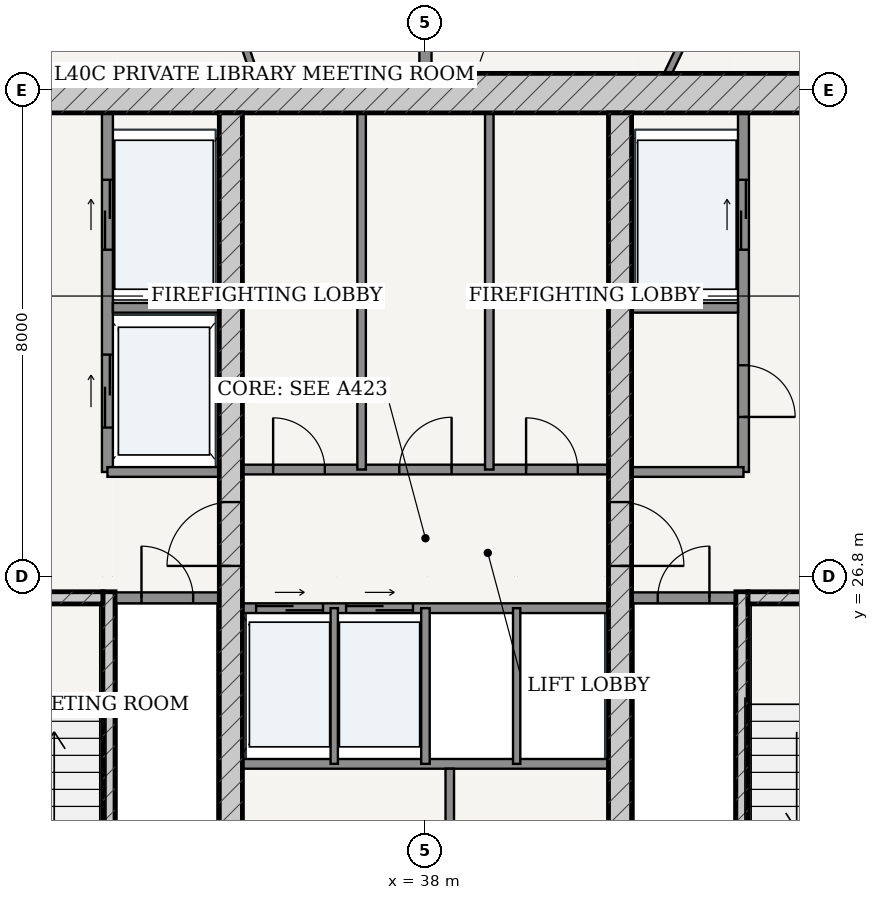
"""IFC4 building model, lengths in metres.
Left out: names, types, materials, properties, quantities, classifications, styles, units other than length and angle.
Written with IfcOpenShell. Run it as: python <this file> out.ifc"""

import sys

from ifc_helpers import new_model, si_unit, direction, frame, frame_2d, origin, place, context, subcontext, project, spatial, rectangle, extrude, source, transform, mapped, element, fill, save


model = new_model("IFC4")
c1 = context("Model", 3, precision=1e-05, world=origin(), true_north=direction((-0.2419218956, 0.970295726276)))
c2 = subcontext(c1, "Body", "Model", "MODEL_VIEW")
j1 = project(units=[si_unit("LENGTHUNIT", "METRE"), si_unit("PLANEANGLEUNIT", "RADIAN")], contexts=[c1])
p1 = place(None, origin())
s1 = spatial("IfcSite", under=j1, at=p1, CompositionType="ELEMENT")
p2 = place(p1, origin())
s2 = spatial("IfcBuilding", under=s1, at=p2, CompositionType="ELEMENT")
p3 = place(p2, frame((0.0, 0.0, 153.4)))
s3 = spatial("IfcBuildingStorey", under=s2, at=p3, CompositionType="ELEMENT", Elevation=153.4)
p4 = place(p3, frame((28.725, 34.75, 0.0), z_axis=(0.0, 0.0, 1.0), x_axis=(1.0, 0.0, 0.0)))
e1 = element("IfcWall", 1, at=p4, inside=s3, PredefinedType="SHEAR", context=c2, shape_type="SweptSolid", body=[
    extrude(rectangle(XDim=18.55, YDim=0.65, at=frame_2d((9.275, 0.0))), origin(), (0.0, 0.0, 1.0), 3.33),
])
p5 = place(p3, frame((32.795, 19.175, 0.0), z_axis=(0.0, 0.0, 1.0), x_axis=(0.0, 1.0, 0.0)))
e2 = element("IfcWall", 2, at=p5, inside=s3, PredefinedType="SOLIDWALL", context=c2, shape_type="SweptSolid", body=[
    extrude(rectangle(XDim=7.375, YDim=0.2, at=frame_2d((3.688, 0.0))), origin(), (0.0, 0.0, 1.0), 3.33),
])
p6 = place(p3, frame((29.375, 26.45, 0.0), z_axis=(0.0, 0.0, 1.0), x_axis=(1.0, 0.0, 0.0)))
e3 = element("IfcWall", 3, at=p6, inside=s3, PredefinedType="SOLIDWALL", context=c2, shape_type="SweptSolid", body=[
    extrude(rectangle(XDim=3.32, YDim=0.2, at=frame_2d((1.66, 0.0))), origin(), (0.0, 0.0, 1.0), 3.33),
])
p7 = place(p6, frame((1.185, 0.0, 0.0)))
e4 = element("IfcOpeningElement", 4, at=p7, cuts=e3, PredefinedType="OPENING", context=c2, shape_type="SweptSolid", body=[
    extrude(rectangle(XDim=0.95, YDim=2.15, at=frame_2d((0.475, 1.075))), frame((0.0, 0.11, 0.0), z_axis=(0.0, -1.0, 0.0), x_axis=(1.0, 0.0, 0.0)), (0.0, 0.0, 1.0), 0.22),
])
p8 = place(p3, frame((43.205, 19.175, 0.0), z_axis=(0.0, 0.0, 1.0), x_axis=(0.0, 1.0, 0.0)))
e5 = element("IfcWall", 5, at=p8, inside=s3, PredefinedType="SOLIDWALL", context=c2, shape_type="SweptSolid", body=[
    extrude(rectangle(XDim=7.375, YDim=0.2, at=frame_2d((3.688, 0.0))), origin(), (0.0, 0.0, 1.0), 3.33),
])
p9 = place(p3, frame((43.305, 26.45, 0.0), z_axis=(0.0, 0.0, 1.0), x_axis=(1.0, 0.0, 0.0)))
e6 = element("IfcWall", 6, at=p9, inside=s3, PredefinedType="SOLIDWALL", context=c2, shape_type="SweptSolid", body=[
    extrude(rectangle(XDim=3.32, YDim=0.2, at=frame_2d((1.66, 0.0))), origin(), (0.0, 0.0, 1.0), 3.33),
])
p10 = place(p9, frame((1.185, 0.0, 0.0)))
e7 = element("IfcOpeningElement", 7, at=p10, cuts=e6, PredefinedType="OPENING", context=c2, shape_type="SweptSolid", body=[
    extrude(rectangle(XDim=0.95, YDim=2.15, at=frame_2d((0.475, 1.075))), frame((0.0, 0.11, 0.0), z_axis=(0.0, -1.0, 0.0), x_axis=(1.0, 0.0, 0.0)), (0.0, 0.0, 1.0), 0.22),
])
p11 = place(p3, frame((34.8, 19.175, 0.0), z_axis=(0.0, 0.0, 1.0), x_axis=(0.0, 1.0, 0.0)))
e8 = element("IfcWall", 8, at=p11, inside=s3, PredefinedType="SHEAR", context=c2, shape_type="SweptSolid", body=[
    extrude(rectangle(XDim=15.25, YDim=0.38, at=frame_2d((7.625, 0.0))), origin(), (0.0, 0.0, 1.0), 3.33),
])
p12 = place(p11, frame((7.8, 0.0, 0.0)))
e9 = element("IfcOpeningElement", 9, at=p12, cuts=e8, PredefinedType="OPENING", context=c2, shape_type="SweptSolid", body=[
    extrude(rectangle(XDim=1.05, YDim=2.15, at=frame_2d((0.525, 1.075))), frame((0.0, 0.2, 0.0), z_axis=(0.0, -1.0, 0.0), x_axis=(1.0, 0.0, 0.0)), (0.0, 0.0, 1.0), 0.4),
])
p13 = place(p3, frame((41.2, 19.175, 0.0), z_axis=(0.0, 0.0, 1.0), x_axis=(0.0, 1.0, 0.0)))
e10 = element("IfcWall", 10, at=p13, inside=s3, PredefinedType="SHEAR", context=c2, shape_type="SweptSolid", body=[
    extrude(rectangle(XDim=15.25, YDim=0.38, at=frame_2d((7.625, 0.0))), origin(), (0.0, 0.0, 1.0), 3.33),
])
p14 = place(p13, frame((7.8, 0.0, 0.0)))
e11 = element("IfcOpeningElement", 11, at=p14, cuts=e10, PredefinedType="OPENING", context=c2, shape_type="SweptSolid", body=[
    extrude(rectangle(XDim=1.05, YDim=2.15, at=frame_2d((0.525, 1.075))), frame((0.0, 0.2, 0.0), z_axis=(0.0, -1.0, 0.0), x_axis=(1.0, 0.0, 0.0)), (0.0, 0.0, 1.0), 0.4),
])
p15 = place(p3, frame((32.9, 26.45, 0.0), z_axis=(0.0, 0.0, 1.0), x_axis=(1.0, 0.0, 0.0)))
e12 = element("IfcWall", 12, at=p15, inside=s3, PredefinedType="PARTITIONING", context=c2, shape_type="SweptSolid", body=[
    extrude(rectangle(XDim=1.71, YDim=0.18, at=frame_2d((0.855, 0.0))), origin(), (0.0, 0.0, 1.0), 3.33),
])
p16 = place(p15, frame((0.43, 0.0, 0.0)))
e13 = element("IfcOpeningElement", 13, at=p16, cuts=e12, PredefinedType="OPENING", context=c2, shape_type="SweptSolid", body=[
    extrude(rectangle(XDim=0.85, YDim=2.1, at=frame_2d((0.425, 1.05))), frame((0.0, 0.1, 0.0), z_axis=(0.0, -1.0, 0.0), x_axis=(1.0, 0.0, 0.0)), (0.0, 0.0, 1.0), 0.2),
])
p17 = place(p3, frame((41.39, 26.45, 0.0), z_axis=(0.0, 0.0, 1.0), x_axis=(1.0, 0.0, 0.0)))
e14 = element("IfcWall", 14, at=p17, inside=s3, PredefinedType="PARTITIONING", context=c2, shape_type="SweptSolid", body=[
    extrude(rectangle(XDim=1.71, YDim=0.18, at=frame_2d((0.855, 0.0))), origin(), (0.0, 0.0, 1.0), 3.33),
])
p18 = place(p17, frame((0.43, 0.0, 0.0)))
e15 = element("IfcOpeningElement", 15, at=p18, cuts=e14, PredefinedType="OPENING", context=c2, shape_type="SweptSolid", body=[
    extrude(rectangle(XDim=0.85, YDim=2.1, at=frame_2d((0.425, 1.05))), frame((0.0, 0.1, 0.0), z_axis=(0.0, -1.0, 0.0), x_axis=(1.0, 0.0, 0.0)), (0.0, 0.0, 1.0), 0.2),
])
p19 = place(p3, frame((32.77, 28.52, 0.0), z_axis=(0.0, 0.0, 1.0), x_axis=(0.0, 1.0, 0.0)))
e16 = element("IfcWall", 16, at=p19, inside=s3, PredefinedType="PARTITIONING", context=c2, shape_type="SweptSolid", body=[
    extrude(rectangle(XDim=5.905, YDim=0.18, at=frame_2d((2.953, 0.0))), origin(), (0.0, 0.0, 1.0), 3.33),
])
p20 = place(p19, frame((3.655, 0.0, 0.0)))
e17 = element("IfcOpeningElement", 17, at=p20, cuts=e16, PredefinedType="OPENING", context=c2, shape_type="SweptSolid", body=[
    extrude(rectangle(XDim=1.15, YDim=2.2, at=frame_2d((0.575, 1.1))), frame((0.0, 0.1, 0.0), z_axis=(0.0, -1.0, 0.0), x_axis=(1.0, 0.0, 0.0)), (0.0, 0.0, 1.0), 0.2),
])
p21 = place(p19, frame((0.73, 0.0, 0.0)))
e18 = element("IfcOpeningElement", 18, at=p21, cuts=e16, PredefinedType="OPENING", context=c2, shape_type="SweptSolid", body=[
    extrude(rectangle(XDim=1.2, YDim=2.25, at=frame_2d((0.6, 1.125))), frame((0.0, 0.1, 0.0), z_axis=(0.0, -1.0, 0.0), x_axis=(1.0, 0.0, 0.0)), (0.0, 0.0, 1.0), 0.2),
])
p22 = place(p3, frame((32.86, 31.22, 0.0), z_axis=(0.0, 0.0, 1.0), x_axis=(1.0, 0.0, 0.0)))
e19 = element("IfcWall", 19, at=p22, inside=s3, PredefinedType="PARTITIONING", context=c2, shape_type="SweptSolid", body=[
    extrude(rectangle(XDim=1.75, YDim=0.16, at=frame_2d((0.875, 0.0))), origin(), (0.0, 0.0, 1.0), 3.33),
])
p23 = place(p3, frame((32.77, 28.52, 0.0), z_axis=(0.0, 0.0, 1.0), x_axis=(1.0, 0.0, 0.0)))
e20 = element("IfcWall", 20, at=p23, inside=s3, PredefinedType="PARTITIONING", context=c2, shape_type="SweptSolid", body=[
    extrude(rectangle(XDim=1.84, YDim=0.16, at=frame_2d((0.92, 0.0))), origin(), (0.0, 0.0, 1.0), 3.33),
])
p24 = place(p3, frame((43.23, 28.52, 0.0), z_axis=(0.0, 0.0, 1.0), x_axis=(0.0, 1.0, 0.0)))
e21 = element("IfcWall", 21, at=p24, inside=s3, PredefinedType="PARTITIONING", context=c2, shape_type="SweptSolid", body=[
    extrude(rectangle(XDim=5.905, YDim=0.18, at=frame_2d((2.953, 0.0))), origin(), (0.0, 0.0, 1.0), 3.33),
])
p25 = place(p24, frame((0.905, 0.0, 0.0)))
e22 = element("IfcOpeningElement", 22, at=p25, cuts=e21, PredefinedType="OPENING", context=c2, shape_type="SweptSolid", body=[
    extrude(rectangle(XDim=0.85, YDim=2.1, at=frame_2d((0.425, 1.05))), frame((0.0, 0.1, 0.0), z_axis=(0.0, -1.0, 0.0), x_axis=(1.0, 0.0, 0.0)), (0.0, 0.0, 1.0), 0.2),
])
p26 = place(p24, frame((3.655, 0.0, 0.0)))
e23 = element("IfcOpeningElement", 23, at=p26, cuts=e21, PredefinedType="OPENING", context=c2, shape_type="SweptSolid", body=[
    extrude(rectangle(XDim=1.15, YDim=2.2, at=frame_2d((0.575, 1.1))), frame((0.0, 0.1, 0.0), z_axis=(0.0, -1.0, 0.0), x_axis=(1.0, 0.0, 0.0)), (0.0, 0.0, 1.0), 0.2),
])
p27 = place(p3, frame((41.39, 31.22, 0.0), z_axis=(0.0, 0.0, 1.0), x_axis=(1.0, 0.0, 0.0)))
e24 = element("IfcWall", 24, at=p27, inside=s3, PredefinedType="PARTITIONING", context=c2, shape_type="SweptSolid", body=[
    extrude(rectangle(XDim=1.75, YDim=0.16, at=frame_2d((0.875, 0.0))), origin(), (0.0, 0.0, 1.0), 3.33),
])
p28 = place(p3, frame((41.39, 28.52, 0.0), z_axis=(0.0, 0.0, 1.0), x_axis=(1.0, 0.0, 0.0)))
e25 = element("IfcWall", 25, at=p28, inside=s3, PredefinedType="PARTITIONING", context=c2, shape_type="SweptSolid", body=[
    extrude(rectangle(XDim=1.84, YDim=0.16, at=frame_2d((0.92, 0.0))), origin(), (0.0, 0.0, 1.0), 3.33),
])
p29 = place(p3, frame((34.99, 28.56, 0.0), z_axis=(0.0, 0.0, 1.0), x_axis=(1.0, 0.0, 0.0)))
e26 = element("IfcWall", 26, at=p29, inside=s3, PredefinedType="PARTITIONING", context=c2, shape_type="SweptSolid", body=[
    extrude(rectangle(XDim=6.02, YDim=0.16, at=frame_2d((3.01, 0.0))), origin(), (0.0, 0.0, 1.0), 3.33),
])
p30 = place(p29, frame((0.505, 0.0, 0.0)))
e27 = element("IfcOpeningElement", 27, at=p30, cuts=e26, PredefinedType="OPENING", context=c2, shape_type="SweptSolid", body=[
    extrude(rectangle(XDim=0.85, YDim=2.1, at=frame_2d((0.425, 1.05))), frame((0.0, 0.09, 0.0), z_axis=(0.0, -1.0, 0.0), x_axis=(1.0, 0.0, 0.0)), (0.0, 0.0, 1.0), 0.18),
])
p31 = place(p29, frame((2.58, 0.0, 0.0)))
e28 = element("IfcOpeningElement", 28, at=p31, cuts=e26, PredefinedType="OPENING", context=c2, shape_type="SweptSolid", body=[
    extrude(rectangle(XDim=0.86, YDim=2.1, at=frame_2d((0.43, 1.05))), frame((0.0, 0.09, 0.0), z_axis=(0.0, -1.0, 0.0), x_axis=(1.0, 0.0, 0.0)), (0.0, 0.0, 1.0), 0.18),
])
p32 = place(p29, frame((4.665, 0.0, 0.0)))
e29 = element("IfcOpeningElement", 29, at=p32, cuts=e26, PredefinedType="OPENING", context=c2, shape_type="SweptSolid", body=[
    extrude(rectangle(XDim=0.85, YDim=2.1, at=frame_2d((0.425, 1.05))), frame((0.0, 0.09, 0.0), z_axis=(0.0, -1.0, 0.0), x_axis=(1.0, 0.0, 0.0)), (0.0, 0.0, 1.0), 0.18),
])
for number, where, z_axis, x_axis in (
    (30, (36.95, 28.56, 0.0), (0.0, 0.0, 1.0), (0.0, 1.0, 0.0)),
    (31, (39.05, 28.56, 0.0), (0.0, 0.0, 1.0), (0.0, 1.0, 0.0)),
):
    element("IfcWall", number, at=place(p3, frame(where, z_axis=z_axis, x_axis=x_axis)), inside=s3, PredefinedType="PARTITIONING", context=c2, shape_type="SweptSolid", body=[
        extrude(rectangle(XDim=5.865, YDim=0.14, at=frame_2d((2.933, 0.0))), origin(), (0.0, 0.0, 1.0), 3.33),
    ])
p33 = place(p3, frame((34.99, 26.28, 0.0), z_axis=(0.0, 0.0, 1.0), x_axis=(1.0, 0.0, 0.0)))
e32 = element("IfcWall", 32, at=p33, inside=s3, PredefinedType="PARTITIONING", context=c2, shape_type="SweptSolid", body=[
    extrude(rectangle(XDim=6.02, YDim=0.16, at=frame_2d((3.01, 0.0))), origin(), (0.0, 0.0, 1.0), 3.33),
])
p34 = place(p33, frame((0.225, 0.0, 0.0)))
e33 = element("IfcOpeningElement", 33, at=p34, cuts=e32, PredefinedType="OPENING", context=c2, shape_type="SweptSolid", body=[
    extrude(rectangle(XDim=1.1, YDim=2.2, at=frame_2d((0.55, 1.1))), frame((0.0, 0.09, 0.0), z_axis=(0.0, -1.0, 0.0), x_axis=(1.0, 0.0, 0.0)), (0.0, 0.0, 1.0), 0.18),
])
p35 = place(p33, frame((1.705, 0.0, 0.0)))
e34 = element("IfcOpeningElement", 34, at=p35, cuts=e32, PredefinedType="OPENING", context=c2, shape_type="SweptSolid", body=[
    extrude(rectangle(XDim=1.1, YDim=2.2, at=frame_2d((0.55, 1.1))), frame((0.0, 0.09, 0.0), z_axis=(0.0, -1.0, 0.0), x_axis=(1.0, 0.0, 0.0)), (0.0, 0.0, 1.0), 0.18),
])
p36 = place(p3, frame((34.99, 23.72, 0.0), z_axis=(0.0, 0.0, 1.0), x_axis=(1.0, 0.0, 0.0)))
e35 = element("IfcWall", 35, at=p36, inside=s3, PredefinedType="PARTITIONING", context=c2, shape_type="SweptSolid", body=[
    extrude(rectangle(XDim=6.02, YDim=0.16, at=frame_2d((3.01, 0.0))), origin(), (0.0, 0.0, 1.0), 3.33),
])
p37 = place(p3, frame((36.5, 23.72, 0.0), z_axis=(0.0, 0.0, 1.0), x_axis=(0.0, 1.0, 0.0)))
e36 = element("IfcWall", 36, at=p37, inside=s3, PredefinedType="PARTITIONING", context=c2, shape_type="SweptSolid", body=[
    extrude(rectangle(XDim=2.56, YDim=0.12, at=frame_2d((1.28, 0.0))), origin(), (0.0, 0.0, 1.0), 3.33),
])
p38 = place(p3, frame((38.0, 23.72, 0.0), z_axis=(0.0, 0.0, 1.0), x_axis=(0.0, 1.0, 0.0)))
e37 = element("IfcWall", 37, at=p38, inside=s3, PredefinedType="PARTITIONING", context=c2, shape_type="SweptSolid", body=[
    extrude(rectangle(XDim=2.56, YDim=0.14, at=frame_2d((1.28, 0.0))), origin(), (0.0, 0.0, 1.0), 3.33),
])
p39 = place(p3, frame((39.5, 23.72, 0.0), z_axis=(0.0, 0.0, 1.0), x_axis=(0.0, 1.0, 0.0)))
e38 = element("IfcWall", 38, at=p39, inside=s3, PredefinedType="PARTITIONING", context=c2, shape_type="SweptSolid", body=[
    extrude(rectangle(XDim=2.56, YDim=0.12, at=frame_2d((1.28, 0.0))), origin(), (0.0, 0.0, 1.0), 3.33),
])
p40 = place(p3, frame((38.4, 19.175, 0.0), z_axis=(0.0, 0.0, 1.0), x_axis=(0.0, 1.0, 0.0)))
e39 = element("IfcWall", 39, at=p40, inside=s3, PredefinedType="PARTITIONING", context=c2, shape_type="SweptSolid", body=[
    extrude(rectangle(XDim=4.465, YDim=0.14, at=frame_2d((2.232, 0.0))), origin(), (0.0, 0.0, 1.0), 3.33),
])
p41 = place(p3, frame((38.0, 35.075, 0.0), z_axis=(0.0, 0.0, 1.0), x_axis=(0.0, 1.0, 0.0)))
e40 = element("IfcWall", 40, at=p41, inside=s3, PredefinedType="PARTITIONING", context=c2, shape_type="SweptSolid", body=[
    extrude(rectangle(XDim=12.465, YDim=0.2, at=frame_2d((6.232, 0.0))), origin(), (0.0, 0.0, 1.0), 2.415),
])
p42 = place(p3, frame((35.182, 35.075, 0.0), z_axis=(0.0, 0.0, 1.0), x_axis=(-0.322321614946, 0.946630221649, 0.0)))
e41 = element("IfcWall", 41, at=p42, inside=s3, PredefinedType="PARTITIONING", context=c2, shape_type="SweptSolid", body=[
    extrude(rectangle(XDim=2.737, YDim=0.12, at=frame_2d((1.369, 0.0))), origin(), (0.0, 0.0, 1.0), 2.415),
])
p43 = place(p3, frame((41.988, 35.075, 0.0), z_axis=(0.0, 0.0, 1.0), x_axis=(0.434144408634, 0.900843289619, 0.0)))
e42 = element("IfcWall", 42, at=p43, inside=s3, PredefinedType="PARTITIONING", context=c2, shape_type="SweptSolid", body=[
    extrude(rectangle(XDim=2.88, YDim=0.12, at=frame_2d((1.44, 0.0))), origin(), (0.0, 0.0, 1.0), 3.33),
])
m1 = source(origin(), c2, "Body", "SweptSolid", [
    extrude(rectangle(XDim=1.05, YDim=2.15, at=frame_2d((0.525, 1.075))), frame((0.0, 0.025, 0.0), z_axis=(0.0, -1.0, 0.0), x_axis=(1.0, 0.0, 0.0)), (0.0, 0.0, 1.0), 0.05),
])
p44 = place(p12, origin())
e43 = element("IfcDoor", 43, at=p44, inside=s3, OperationType="SINGLE_SWING_LEFT", PredefinedType="DOOR", context=c2, shape_type="MappedRepresentation", body=[
    mapped(m1, transform((0.0, 0.0, 0.0), scale=1.0)),
])
fill(e9, e43)
p45 = place(p14, frame((1.05, 0.0, 0.0), z_axis=(0.0, 0.0, 1.0), x_axis=(-1.0, 0.0, 0.0)))
e44 = element("IfcDoor", 44, at=p45, inside=s3, OperationType="SINGLE_SWING_RIGHT", PredefinedType="DOOR", context=c2, shape_type="MappedRepresentation", body=[
    mapped(m1, transform((0.0, 0.0, 0.0), scale=1.0)),
])
fill(e11, e44)
m2 = source(origin(), c2, "Body", "SweptSolid", [
    extrude(rectangle(XDim=0.85, YDim=2.1, at=frame_2d((0.425, 1.05))), frame((0.0, 0.025, 0.0), z_axis=(0.0, -1.0, 0.0), x_axis=(1.0, 0.0, 0.0)), (0.0, 0.0, 1.0), 0.05),
])
p46 = place(p16, origin())
e45 = element("IfcDoor", 45, at=p46, inside=s3, OperationType="SINGLE_SWING_LEFT", PredefinedType="DOOR", context=c2, shape_type="MappedRepresentation", body=[
    mapped(m2, transform((0.0, 0.0, 0.0), scale=1.0)),
])
fill(e13, e45)
p47 = place(p18, origin())
e46 = element("IfcDoor", 46, at=p47, inside=s3, OperationType="SINGLE_SWING_RIGHT", PredefinedType="DOOR", context=c2, shape_type="MappedRepresentation", body=[
    mapped(m2, transform((0.0, 0.0, 0.0), scale=1.0)),
])
fill(e15, e46)
p48 = place(p25, frame((0.85, 0.0, 0.0), z_axis=(0.0, 0.0, 1.0), x_axis=(-1.0, 0.0, 0.0)))
e47 = element("IfcDoor", 47, at=p48, inside=s3, OperationType="SINGLE_SWING_RIGHT", PredefinedType="DOOR", context=c2, shape_type="MappedRepresentation", body=[
    mapped(m2, transform((0.0, 0.0, 0.0), scale=1.0)),
])
fill(e22, e47)
p49 = place(p30, origin())
e48 = element("IfcDoor", 48, at=p49, inside=s3, OperationType="SINGLE_SWING_LEFT", PredefinedType="DOOR", context=c2, shape_type="MappedRepresentation", body=[
    mapped(m2, transform((0.0, 0.0, 0.0), scale=1.0)),
])
fill(e27, e48)
m3 = source(origin(), c2, "Body", "SweptSolid", [
    extrude(rectangle(XDim=0.86, YDim=2.1, at=frame_2d((0.43, 1.05))), frame((0.0, 0.025, 0.0), z_axis=(0.0, -1.0, 0.0), x_axis=(1.0, 0.0, 0.0)), (0.0, 0.0, 1.0), 0.05),
])
p50 = place(p31, origin())
e49 = element("IfcDoor", 49, at=p50, inside=s3, OperationType="SINGLE_SWING_RIGHT", PredefinedType="DOOR", context=c2, shape_type="MappedRepresentation", body=[
    mapped(m3, transform((0.0, 0.0, 0.0), scale=1.0)),
])
fill(e28, e49)
p51 = place(p32, origin())
e50 = element("IfcDoor", 50, at=p51, inside=s3, OperationType="SINGLE_SWING_LEFT", PredefinedType="DOOR", context=c2, shape_type="MappedRepresentation", body=[
    mapped(m2, transform((0.0, 0.0, 0.0), scale=1.0)),
])
fill(e29, e50)
m4 = source(origin(), c2, "Body", "SweptSolid", [
    extrude(rectangle(XDim=1.15, YDim=2.2, at=frame_2d((0.575, 1.1))), frame((0.0, 0.025, 0.0), z_axis=(0.0, -1.0, 0.0), x_axis=(1.0, 0.0, 0.0)), (0.0, 0.0, 1.0), 0.05),
])
p52 = place(p20, origin())
e51 = element("IfcDoor", 51, at=p52, inside=s3, OperationType="DOUBLE_DOOR_SLIDING", PredefinedType="DOOR", context=c2, shape_type="MappedRepresentation", body=[
    mapped(m4, transform((0.0, 0.0, 0.0), scale=1.0)),
])
fill(e17, e51)
p53 = place(p26, origin())
e52 = element("IfcDoor", 52, at=p53, inside=s3, OperationType="DOUBLE_DOOR_SLIDING", PredefinedType="DOOR", context=c2, shape_type="MappedRepresentation", body=[
    mapped(m4, transform((0.0, 0.0, 0.0), scale=1.0)),
])
fill(e23, e52)
m5 = source(origin(), c2, "Body", "SweptSolid", [
    extrude(rectangle(XDim=1.2, YDim=2.25, at=frame_2d((0.6, 1.125))), frame((0.0, 0.025, 0.0), z_axis=(0.0, -1.0, 0.0), x_axis=(1.0, 0.0, 0.0)), (0.0, 0.0, 1.0), 0.05),
])
p54 = place(p21, origin())
e53 = element("IfcDoor", 53, at=p54, inside=s3, OperationType="DOUBLE_DOOR_SLIDING", PredefinedType="DOOR", context=c2, shape_type="MappedRepresentation", body=[
    mapped(m5, transform((0.0, 0.0, 0.0), scale=1.0)),
])
fill(e18, e53)
m6 = source(origin(), c2, "Body", "SweptSolid", [
    extrude(rectangle(XDim=1.1, YDim=2.2, at=frame_2d((0.55, 1.1))), frame((0.0, 0.025, 0.0), z_axis=(0.0, -1.0, 0.0), x_axis=(1.0, 0.0, 0.0)), (0.0, 0.0, 1.0), 0.05),
])
p55 = place(p34, origin())
e54 = element("IfcDoor", 54, at=p55, inside=s3, OperationType="DOUBLE_DOOR_SLIDING", PredefinedType="DOOR", context=c2, shape_type="MappedRepresentation", body=[
    mapped(m6, transform((0.0, 0.0, 0.0), scale=1.0)),
])
fill(e33, e54)
p56 = place(p35, origin())
e55 = element("IfcDoor", 55, at=p56, inside=s3, OperationType="DOUBLE_DOOR_SLIDING", PredefinedType="DOOR", context=c2, shape_type="MappedRepresentation", body=[
    mapped(m6, transform((0.0, 0.0, 0.0), scale=1.0)),
])
fill(e34, e55)
save(model, sys.argv[1])
